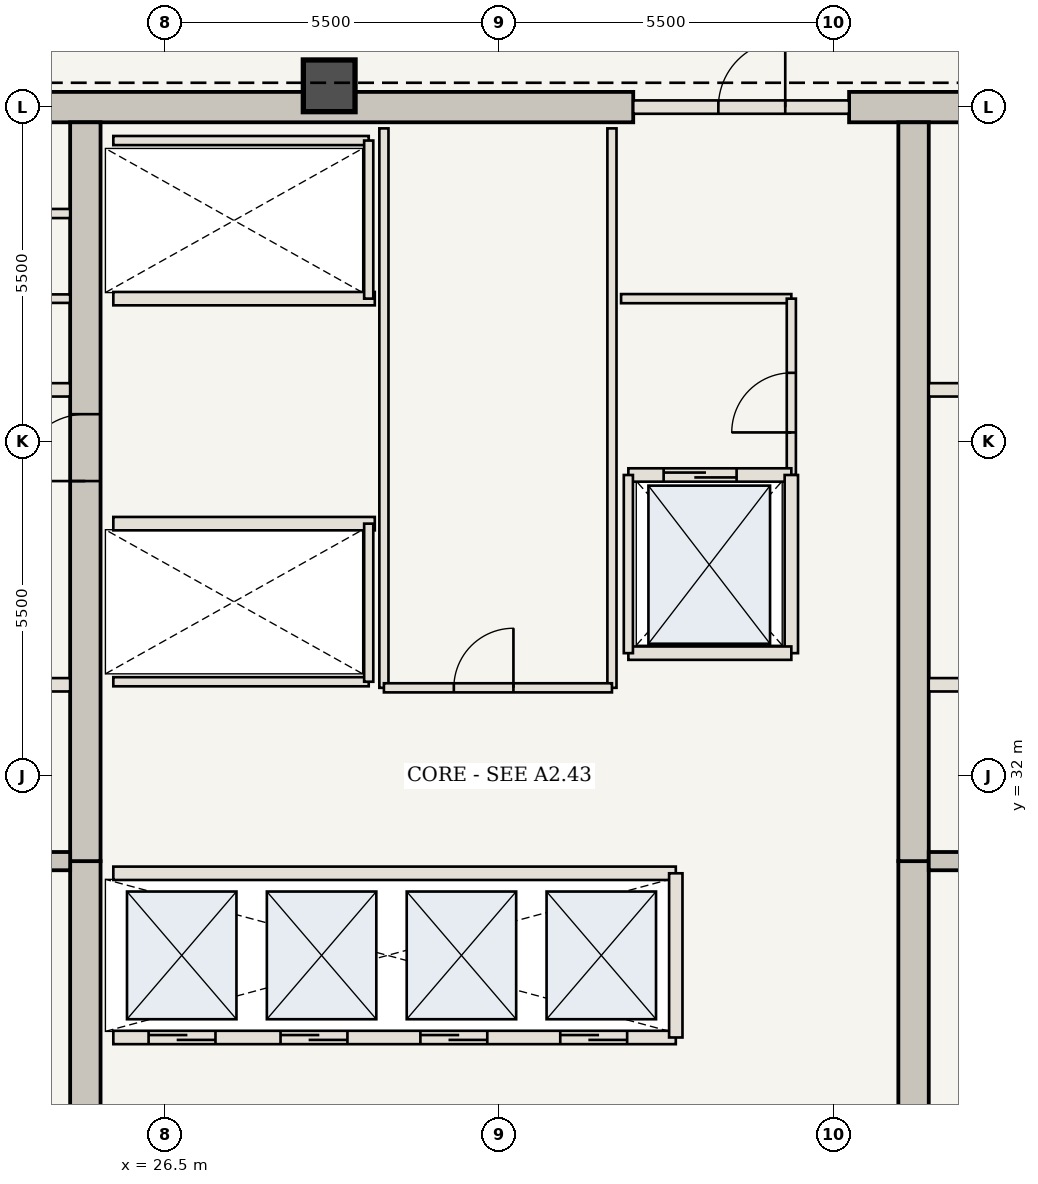
"""IFC4 building model, lengths in metres.
Left out: names, types, materials, properties, quantities, classifications, styles, units other than length and angle.
Written with IfcOpenShell. Run it as: python <this file> out.ifc"""

import sys

from ifc_helpers import new_model, si_unit, direction, frame, frame_2d, origin, origin_2d, place, context, subcontext, project, spatial, rectangle, extrude, element, fill, save


model = new_model("IFC4")
c1 = context("Model", 3, precision=1e-05, world=origin(), true_north=direction((0.0, 1.0)))
c2 = subcontext(c1, "Body", "Model", "MODEL_VIEW")
j1 = project(units=[si_unit("LENGTHUNIT", "METRE"), si_unit("PLANEANGLEUNIT", "RADIAN")], contexts=[c1])
p1 = place(None, origin())
s1 = spatial("IfcSite", under=j1, at=p1, CompositionType="ELEMENT")
p2 = place(p1, origin())
s2 = spatial("IfcBuilding", under=s1, at=p2, CompositionType="ELEMENT")
p3 = place(p2, frame((0.0, 0.0, 194.6)))
s3 = spatial("IfcBuildingStorey", under=s2, at=p3, CompositionType="ELEMENT", Elevation=194.6)
p4 = place(p3, frame((21.41, 43.0, 0.0), z_axis=(0.0, 0.0, 1.0), x_axis=(1.0, 0.0, 0.0)))
e1 = element("IfcWall", 1, at=p4, inside=s3, PredefinedType="SHEAR", context=c2, shape_type="SweptSolid", body=[
    extrude(rectangle(XDim=12.79, YDim=0.5, at=frame_2d((6.395, 0.0))), origin(), (0.0, 0.0, 1.0), 3.85),
])
p5 = place(p3, frame((37.75, 43.0, 0.0), z_axis=(0.0, 0.0, 1.0), x_axis=(1.0, 0.0, 0.0)))
e2 = element("IfcWall", 2, at=p5, inside=s3, PredefinedType="SHEAR", context=c2, shape_type="SweptSolid", body=[
    extrude(rectangle(XDim=4.84, YDim=0.5, at=frame_2d((2.42, 0.0))), origin(), (0.0, 0.0, 1.0), 3.85),
])
p6 = place(p3, frame((25.19, 21.2, 0.0), z_axis=(0.0, 0.0, 1.0), x_axis=(0.0, 1.0, 0.0)))
e3 = element("IfcWall", 3, at=p6, inside=s3, PredefinedType="SHEAR", context=c2, shape_type="SweptSolid", body=[
    extrude(rectangle(XDim=9.4, YDim=0.5, at=frame_2d((4.7, 0.0))), origin(), (0.0, 0.0, 1.0), 3.85),
])
p7 = place(p3, frame((25.19, 30.6, 0.0), z_axis=(0.0, 0.0, 1.0), x_axis=(0.0, 1.0, 0.0)))
e4 = element("IfcWall", 4, at=p7, inside=s3, PredefinedType="SHEAR", context=c2, shape_type="SweptSolid", body=[
    extrude(rectangle(XDim=12.15, YDim=0.5, at=frame_2d((6.075, 0.0))), origin(), (0.0, 0.0, 1.0), 3.85),
])
p8 = place(p7, frame((6.25, 0.0, 0.0)))
e5 = element("IfcOpeningElement", 5, at=p8, cuts=e4, PredefinedType="OPENING", context=c2, shape_type="SweptSolid", body=[
    extrude(rectangle(XDim=1.1, YDim=2.15, at=frame_2d((0.55, 1.075))), frame((0.0, 0.26, 0.0), z_axis=(0.0, -1.0, 0.0), x_axis=(1.0, 0.0, 0.0)), (0.0, 0.0, 1.0), 0.52),
])
p9 = place(p3, frame((38.81, 21.2, 0.0), z_axis=(0.0, 0.0, 1.0), x_axis=(0.0, 1.0, 0.0)))
e6 = element("IfcWall", 6, at=p9, inside=s3, PredefinedType="SHEAR", context=c2, shape_type="SweptSolid", body=[
    extrude(rectangle(XDim=9.4, YDim=0.5, at=frame_2d((4.7, 0.0))), origin(), (0.0, 0.0, 1.0), 3.85),
])
p10 = place(p3, frame((38.81, 30.6, 0.0), z_axis=(0.0, 0.0, 1.0), x_axis=(0.0, 1.0, 0.0)))
e7 = element("IfcWall", 7, at=p10, inside=s3, PredefinedType="SHEAR", context=c2, shape_type="SweptSolid", body=[
    extrude(rectangle(XDim=12.15, YDim=0.5, at=frame_2d((6.075, 0.0))), origin(), (0.0, 0.0, 1.0), 3.85),
])
p11 = place(p3, frame((29.2, 43.35, 0.0), z_axis=(0.0, 0.0, 1.0), x_axis=(1.0, 0.0, 0.0)))
e8 = element("IfcColumn", 8, at=p11, inside=s3, PredefinedType="COLUMN", context=c2, shape_type="SweptSolid", body=[
    extrude(rectangle(XDim=0.85, YDim=0.85, at=origin_2d()), origin(), (0.0, 0.0, 1.0), 3.85),
])
for number, where, z_axis, x_axis in (
    (9, (21.41, 30.6, 0.0), (0.0, 0.0, 1.0), (1.0, 0.0, 0.0)),
    (10, (39.06, 30.6, 0.0), (0.0, 0.0, 1.0), (1.0, 0.0, 0.0)),
):
    element("IfcWall", number, at=place(p3, frame(where, z_axis=z_axis, x_axis=x_axis)), inside=s3, PredefinedType="SHEAR", context=c2, shape_type="SweptSolid", body=[
        extrude(rectangle(XDim=3.53, YDim=0.3, at=frame_2d((1.765, 0.0))), origin(), (0.0, 0.0, 1.0), 3.685),
    ])
p12 = place(p3, frame((21.41, 33.5, 0.0), z_axis=(0.0, 0.0, 1.0), x_axis=(1.0, 0.0, 0.0)))
e11 = element("IfcWall", 11, at=p12, inside=s3, PredefinedType="STANDARD", context=c2, shape_type="SweptSolid", body=[
    extrude(rectangle(XDim=3.53, YDim=0.22, at=frame_2d((1.765, 0.0))), origin(), (0.0, 0.0, 1.0), 3.685),
])
p13 = place(p12, frame((0.75, 0.0, 0.0)))
e12 = element("IfcOpeningElement", 12, at=p13, cuts=e11, PredefinedType="OPENING", context=c2, shape_type="SweptSolid", body=[
    extrude(rectangle(XDim=1.2, YDim=2.2, at=frame_2d((0.6, 1.1))), frame((0.0, 0.12, 0.0), z_axis=(0.0, -1.0, 0.0), x_axis=(1.0, 0.0, 0.0)), (0.0, 0.0, 1.0), 0.24),
])
p14 = place(p3, frame((39.06, 33.5, 0.0), z_axis=(0.0, 0.0, 1.0), x_axis=(1.0, 0.0, 0.0)))
e13 = element("IfcWall", 13, at=p14, inside=s3, PredefinedType="STANDARD", context=c2, shape_type="SweptSolid", body=[
    extrude(rectangle(XDim=3.53, YDim=0.22, at=frame_2d((1.765, 0.0))), origin(), (0.0, 0.0, 1.0), 3.685),
])
p15 = place(p14, frame((1.55, 0.0, 0.0)))
e14 = element("IfcOpeningElement", 14, at=p15, cuts=e13, PredefinedType="OPENING", context=c2, shape_type="SweptSolid", body=[
    extrude(rectangle(XDim=1.2, YDim=2.2, at=frame_2d((0.6, 1.1))), frame((0.0, 0.12, 0.0), z_axis=(0.0, -1.0, 0.0), x_axis=(1.0, 0.0, 0.0)), (0.0, 0.0, 1.0), 0.24),
])
for number, where, z_axis, x_axis in (
    (15, (21.41, 38.35, 0.0), (0.0, 0.0, 1.0), (1.0, 0.0, 0.0)),
    (16, (39.06, 38.35, 0.0), (0.0, 0.0, 1.0), (1.0, 0.0, 0.0)),
):
    element("IfcWall", number, at=place(p3, frame(where, z_axis=z_axis, x_axis=x_axis)), inside=s3, PredefinedType="STANDARD", context=c2, shape_type="SweptSolid", body=[
        extrude(rectangle(XDim=3.53, YDim=0.22, at=frame_2d((1.765, 0.0))), origin(), (0.0, 0.0, 1.0), 3.685),
    ])
p16 = place(p3, frame((21.41, 39.85, 0.0), z_axis=(0.0, 0.0, 1.0), x_axis=(1.0, 0.0, 0.0)))
e17 = element("IfcWall", 17, at=p16, inside=s3, PredefinedType="STANDARD", context=c2, shape_type="SweptSolid", body=[
    extrude(rectangle(XDim=3.53, YDim=0.14, at=frame_2d((1.765, 0.0))), origin(), (0.0, 0.0, 1.0), 3.685),
])
p17 = place(p3, frame((21.41, 41.25, 0.0), z_axis=(0.0, 0.0, 1.0), x_axis=(1.0, 0.0, 0.0)))
e18 = element("IfcWall", 18, at=p17, inside=s3, PredefinedType="STANDARD", context=c2, shape_type="SweptSolid", body=[
    extrude(rectangle(XDim=3.53, YDim=0.15, at=frame_2d((1.765, 0.0))), origin(), (0.0, 0.0, 1.0), 3.685),
])
p18 = place(p3, frame((34.0, 39.85, 0.0), z_axis=(0.0, 0.0, 1.0), x_axis=(1.0, 0.0, 0.0)))
e19 = element("IfcWall", 19, at=p18, inside=s3, PredefinedType="STANDARD", context=c2, shape_type="SweptSolid", body=[
    extrude(rectangle(XDim=2.8, YDim=0.15, at=frame_2d((1.4, 0.0))), origin(), (0.0, 0.0, 1.0), 3.685),
])
p19 = place(p3, frame((36.8, 36.95, 0.0), z_axis=(0.0, 0.0, 1.0), x_axis=(0.0, 1.0, 0.0)))
e20 = element("IfcWall", 20, at=p19, inside=s3, PredefinedType="STANDARD", context=c2, shape_type="SweptSolid", body=[
    extrude(rectangle(XDim=2.9, YDim=0.15, at=frame_2d((1.45, 0.0))), origin(), (0.0, 0.0, 1.0), 3.685),
])
p20 = place(p19, frame((0.7, 0.0, 0.0)))
e21 = element("IfcOpeningElement", 21, at=p20, cuts=e20, PredefinedType="OPENING", context=c2, shape_type="SweptSolid", body=[
    extrude(rectangle(XDim=0.98, YDim=2.2, at=frame_2d((0.49, 1.1))), frame((0.0, 0.085, 0.0), z_axis=(0.0, -1.0, 0.0), x_axis=(1.0, 0.0, 0.0)), (0.0, 0.0, 1.0), 0.17),
])
p21 = place(p3, frame((25.65, 27.7, 0.0), z_axis=(0.0, 0.0, 1.0), x_axis=(1.0, 0.0, 0.0)))
e22 = element("IfcWall", 22, at=p21, inside=s3, PredefinedType="STANDARD", context=c2, shape_type="SweptSolid", body=[
    extrude(rectangle(XDim=9.25, YDim=0.22, at=frame_2d((4.625, 0.0))), origin(), (0.0, 0.0, 1.0), 3.685),
])
p22 = place(p21, frame((0.58, 0.0, 0.0)))
e23 = element("IfcOpeningElement", 23, at=p22, cuts=e22, PredefinedType="OPENING", context=c2, shape_type="SweptSolid", body=[
    extrude(rectangle(XDim=1.1, YDim=2.15, at=frame_2d((0.55, 1.075))), frame((0.0, 0.12, 0.0), z_axis=(0.0, -1.0, 0.0), x_axis=(1.0, 0.0, 0.0)), (0.0, 0.0, 1.0), 0.24),
])
p23 = place(p21, frame((2.75, 0.0, 0.0)))
e24 = element("IfcOpeningElement", 24, at=p23, cuts=e22, PredefinedType="OPENING", context=c2, shape_type="SweptSolid", body=[
    extrude(rectangle(XDim=1.1, YDim=2.15, at=frame_2d((0.55, 1.075))), frame((0.0, 0.12, 0.0), z_axis=(0.0, -1.0, 0.0), x_axis=(1.0, 0.0, 0.0)), (0.0, 0.0, 1.0), 0.24),
])
p24 = place(p21, frame((5.05, 0.0, 0.0)))
e25 = element("IfcOpeningElement", 25, at=p24, cuts=e22, PredefinedType="OPENING", context=c2, shape_type="SweptSolid", body=[
    extrude(rectangle(XDim=1.1, YDim=2.15, at=frame_2d((0.55, 1.075))), frame((0.0, 0.12, 0.0), z_axis=(0.0, -1.0, 0.0), x_axis=(1.0, 0.0, 0.0)), (0.0, 0.0, 1.0), 0.24),
])
p25 = place(p21, frame((7.35, 0.0, 0.0)))
e26 = element("IfcOpeningElement", 26, at=p25, cuts=e22, PredefinedType="OPENING", context=c2, shape_type="SweptSolid", body=[
    extrude(rectangle(XDim=1.1, YDim=2.15, at=frame_2d((0.55, 1.075))), frame((0.0, 0.12, 0.0), z_axis=(0.0, -1.0, 0.0), x_axis=(1.0, 0.0, 0.0)), (0.0, 0.0, 1.0), 0.24),
])
p26 = place(p3, frame((25.65, 30.4, 0.0), z_axis=(0.0, 0.0, 1.0), x_axis=(1.0, 0.0, 0.0)))
e27 = element("IfcWall", 27, at=p26, inside=s3, PredefinedType="STANDARD", context=c2, shape_type="SweptSolid", body=[
    extrude(rectangle(XDim=9.25, YDim=0.22, at=frame_2d((4.625, 0.0))), origin(), (0.0, 0.0, 1.0), 3.685),
])
p27 = place(p3, frame((34.9, 27.7, 0.0), z_axis=(0.0, 0.0, 1.0), x_axis=(0.0, 1.0, 0.0)))
e28 = element("IfcWall", 28, at=p27, inside=s3, PredefinedType="STANDARD", context=c2, shape_type="SweptSolid", body=[
    extrude(rectangle(XDim=2.7, YDim=0.22, at=frame_2d((1.35, 0.0))), origin(), (0.0, 0.0, 1.0), 3.685),
])
p28 = place(p3, frame((25.65, 36.15, 0.0), z_axis=(0.0, 0.0, 1.0), x_axis=(1.0, 0.0, 0.0)))
e29 = element("IfcWall", 29, at=p28, inside=s3, PredefinedType="STANDARD", context=c2, shape_type="SweptSolid", body=[
    extrude(rectangle(XDim=4.3, YDim=0.22, at=frame_2d((2.15, 0.0))), origin(), (0.0, 0.0, 1.0), 3.685),
])
p29 = place(p3, frame((25.65, 33.55, 0.0), z_axis=(0.0, 0.0, 1.0), x_axis=(1.0, 0.0, 0.0)))
e30 = element("IfcWall", 30, at=p29, inside=s3, PredefinedType="STANDARD", context=c2, shape_type="SweptSolid", body=[
    extrude(rectangle(XDim=4.2, YDim=0.15, at=frame_2d((2.1, 0.0))), origin(), (0.0, 0.0, 1.0), 3.685),
])
p30 = place(p3, frame((29.85, 33.55, 0.0), z_axis=(0.0, 0.0, 1.0), x_axis=(0.0, 1.0, 0.0)))
e31 = element("IfcWall", 31, at=p30, inside=s3, PredefinedType="STANDARD", context=c2, shape_type="SweptSolid", body=[
    extrude(rectangle(XDim=2.6, YDim=0.15, at=frame_2d((1.3, 0.0))), origin(), (0.0, 0.0, 1.0), 3.685),
])
p31 = place(p3, frame((25.65, 39.85, 0.0), z_axis=(0.0, 0.0, 1.0), x_axis=(1.0, 0.0, 0.0)))
e32 = element("IfcWall", 32, at=p31, inside=s3, PredefinedType="STANDARD", context=c2, shape_type="SweptSolid", body=[
    extrude(rectangle(XDim=4.3, YDim=0.22, at=frame_2d((2.15, 0.0))), origin(), (0.0, 0.0, 1.0), 3.685),
])
p32 = place(p3, frame((25.65, 42.45, 0.0), z_axis=(0.0, 0.0, 1.0), x_axis=(1.0, 0.0, 0.0)))
e33 = element("IfcWall", 33, at=p32, inside=s3, PredefinedType="STANDARD", context=c2, shape_type="SweptSolid", body=[
    extrude(rectangle(XDim=4.2, YDim=0.15, at=frame_2d((2.1, 0.0))), origin(), (0.0, 0.0, 1.0), 3.685),
])
p33 = place(p3, frame((29.85, 39.85, 0.0), z_axis=(0.0, 0.0, 1.0), x_axis=(0.0, 1.0, 0.0)))
e34 = element("IfcWall", 34, at=p33, inside=s3, PredefinedType="STANDARD", context=c2, shape_type="SweptSolid", body=[
    extrude(rectangle(XDim=2.6, YDim=0.15, at=frame_2d((1.3, 0.0))), origin(), (0.0, 0.0, 1.0), 3.685),
])
for number, where, z_axis, x_axis in (
    (35, (30.1, 33.45, 0.0), (0.0, 0.0, 1.0), (0.0, 1.0, 0.0)),
    (36, (33.85, 33.45, 0.0), (0.0, 0.0, 1.0), (0.0, 1.0, 0.0)),
):
    element("IfcWall", number, at=place(p3, frame(where, z_axis=z_axis, x_axis=x_axis)), inside=s3, PredefinedType="STANDARD", context=c2, shape_type="SweptSolid", body=[
        extrude(rectangle(XDim=9.2, YDim=0.15, at=frame_2d((4.6, 0.0))), origin(), (0.0, 0.0, 1.0), 3.685),
    ])
p34 = place(p3, frame((30.1, 33.45, 0.0), z_axis=(0.0, 0.0, 1.0), x_axis=(1.0, 0.0, 0.0)))
e37 = element("IfcWall", 37, at=p34, inside=s3, PredefinedType="STANDARD", context=c2, shape_type="SweptSolid", body=[
    extrude(rectangle(XDim=3.75, YDim=0.15, at=frame_2d((1.875, 0.0))), origin(), (0.0, 0.0, 1.0), 3.685),
])
p35 = place(p34, frame((1.15, 0.0, 0.0)))
e38 = element("IfcOpeningElement", 38, at=p35, cuts=e37, PredefinedType="OPENING", context=c2, shape_type="SweptSolid", body=[
    extrude(rectangle(XDim=0.98, YDim=2.2, at=frame_2d((0.49, 1.1))), frame((0.0, 0.085, 0.0), z_axis=(0.0, -1.0, 0.0), x_axis=(1.0, 0.0, 0.0)), (0.0, 0.0, 1.0), 0.17),
])
p36 = place(p3, frame((34.2, 43.0, 0.0), z_axis=(0.0, 0.0, 1.0), x_axis=(1.0, 0.0, 0.0)))
e39 = element("IfcWall", 39, at=p36, inside=s3, PredefinedType="STANDARD", context=c2, shape_type="SweptSolid", body=[
    extrude(rectangle(XDim=3.55, YDim=0.22, at=frame_2d((1.775, 0.0))), origin(), (0.0, 0.0, 1.0), 3.685),
])
p37 = place(p36, frame((1.4, 0.0, 0.0)))
e40 = element("IfcOpeningElement", 40, at=p37, cuts=e39, PredefinedType="OPENING", context=c2, shape_type="SweptSolid", body=[
    extrude(rectangle(XDim=1.1, YDim=2.15, at=frame_2d((0.55, 1.075))), frame((0.0, 0.12, 0.0), z_axis=(0.0, -1.0, 0.0), x_axis=(1.0, 0.0, 0.0)), (0.0, 0.0, 1.0), 0.24),
])
p38 = place(p3, frame((34.12, 36.95, 0.0), z_axis=(0.0, 0.0, 1.0), x_axis=(1.0, 0.0, 0.0)))
e41 = element("IfcWall", 41, at=p38, inside=s3, PredefinedType="STANDARD", context=c2, shape_type="SweptSolid", body=[
    extrude(rectangle(XDim=2.68, YDim=0.22, at=frame_2d((1.34, 0.0))), origin(), (0.0, 0.0, 1.0), 3.685),
])
p39 = place(p38, frame((0.58, 0.0, 0.0)))
e42 = element("IfcOpeningElement", 42, at=p39, cuts=e41, PredefinedType="OPENING", context=c2, shape_type="SweptSolid", body=[
    extrude(rectangle(XDim=1.2, YDim=2.2, at=frame_2d((0.6, 1.1))), frame((0.0, 0.12, 0.0), z_axis=(0.0, -1.0, 0.0), x_axis=(1.0, 0.0, 0.0)), (0.0, 0.0, 1.0), 0.24),
])
p40 = place(p3, frame((36.8, 34.02, 0.0), z_axis=(0.0, 0.0, 1.0), x_axis=(0.0, 1.0, 0.0)))
e43 = element("IfcWall", 43, at=p40, inside=s3, PredefinedType="STANDARD", context=c2, shape_type="SweptSolid", body=[
    extrude(rectangle(XDim=2.93, YDim=0.22, at=frame_2d((1.465, 0.0))), origin(), (0.0, 0.0, 1.0), 3.685),
])
p41 = place(p3, frame((34.12, 34.02, 0.0), z_axis=(0.0, 0.0, 1.0), x_axis=(1.0, 0.0, 0.0)))
e44 = element("IfcWall", 44, at=p41, inside=s3, PredefinedType="STANDARD", context=c2, shape_type="SweptSolid", body=[
    extrude(rectangle(XDim=2.68, YDim=0.22, at=frame_2d((1.34, 0.0))), origin(), (0.0, 0.0, 1.0), 3.685),
])
p42 = place(p3, frame((34.12, 34.02, 0.0), z_axis=(0.0, 0.0, 1.0), x_axis=(0.0, 1.0, 0.0)))
e45 = element("IfcWall", 45, at=p42, inside=s3, PredefinedType="STANDARD", context=c2, shape_type="SweptSolid", body=[
    extrude(rectangle(XDim=2.93, YDim=0.15, at=frame_2d((1.465, 0.0))), origin(), (0.0, 0.0, 1.0), 3.685),
])
p43 = place(p8, origin())
e46 = element("IfcDoor", 46, at=p43, inside=s3, OperationType="SINGLE_SWING_LEFT", PredefinedType="DOOR", context=c2, shape_type="SweptSolid", body=[
    extrude(rectangle(XDim=1.1, YDim=2.15, at=frame_2d((0.55, 1.075))), frame((0.0, 0.025, 0.0), z_axis=(0.0, -1.0, 0.0), x_axis=(1.0, 0.0, 0.0)), (0.0, 0.0, 1.0), 0.05),
])
fill(e5, e46)
p44 = place(p20, origin())
e47 = element("IfcDoor", 47, at=p44, inside=s3, OperationType="SINGLE_SWING_LEFT", PredefinedType="DOOR", context=c2, shape_type="SweptSolid", body=[
    extrude(rectangle(XDim=0.98, YDim=2.2, at=frame_2d((0.49, 1.1))), frame((0.0, 0.025, 0.0), z_axis=(0.0, -1.0, 0.0), x_axis=(1.0, 0.0, 0.0)), (0.0, 0.0, 1.0), 0.05),
])
fill(e21, e47)
p45 = place(p22, origin())
e48 = element("IfcDoor", 48, at=p45, inside=s3, OperationType="DOUBLE_DOOR_SLIDING", PredefinedType="DOOR", context=c2, shape_type="SweptSolid", body=[
    extrude(rectangle(XDim=1.1, YDim=2.15, at=frame_2d((0.55, 1.075))), frame((0.0, 0.025, 0.0), z_axis=(0.0, -1.0, 0.0), x_axis=(1.0, 0.0, 0.0)), (0.0, 0.0, 1.0), 0.05),
])
fill(e23, e48)
p46 = place(p23, origin())
e49 = element("IfcDoor", 49, at=p46, inside=s3, OperationType="DOUBLE_DOOR_SLIDING", PredefinedType="DOOR", context=c2, shape_type="SweptSolid", body=[
    extrude(rectangle(XDim=1.1, YDim=2.15, at=frame_2d((0.55, 1.075))), frame((0.0, 0.025, 0.0), z_axis=(0.0, -1.0, 0.0), x_axis=(1.0, 0.0, 0.0)), (0.0, 0.0, 1.0), 0.05),
])
fill(e24, e49)
p47 = place(p24, origin())
e50 = element("IfcDoor", 50, at=p47, inside=s3, OperationType="DOUBLE_DOOR_SLIDING", PredefinedType="DOOR", context=c2, shape_type="SweptSolid", body=[
    extrude(rectangle(XDim=1.1, YDim=2.15, at=frame_2d((0.55, 1.075))), frame((0.0, 0.025, 0.0), z_axis=(0.0, -1.0, 0.0), x_axis=(1.0, 0.0, 0.0)), (0.0, 0.0, 1.0), 0.05),
])
fill(e25, e50)
p48 = place(p25, origin())
e51 = element("IfcDoor", 51, at=p48, inside=s3, OperationType="DOUBLE_DOOR_SLIDING", PredefinedType="DOOR", context=c2, shape_type="SweptSolid", body=[
    extrude(rectangle(XDim=1.1, YDim=2.15, at=frame_2d((0.55, 1.075))), frame((0.0, 0.025, 0.0), z_axis=(0.0, -1.0, 0.0), x_axis=(1.0, 0.0, 0.0)), (0.0, 0.0, 1.0), 0.05),
])
fill(e26, e51)
p49 = place(p35, origin())
e52 = element("IfcDoor", 52, at=p49, inside=s3, OperationType="SINGLE_SWING_RIGHT", PredefinedType="DOOR", context=c2, shape_type="SweptSolid", body=[
    extrude(rectangle(XDim=0.98, YDim=2.2, at=frame_2d((0.49, 1.1))), frame((0.0, 0.025, 0.0), z_axis=(0.0, -1.0, 0.0), x_axis=(1.0, 0.0, 0.0)), (0.0, 0.0, 1.0), 0.05),
])
fill(e38, e52)
p50 = place(p37, origin())
e53 = element("IfcDoor", 53, at=p50, inside=s3, OperationType="SINGLE_SWING_RIGHT", PredefinedType="DOOR", context=c2, shape_type="SweptSolid", body=[
    extrude(rectangle(XDim=1.1, YDim=2.15, at=frame_2d((0.55, 1.075))), frame((0.0, 0.025, 0.0), z_axis=(0.0, -1.0, 0.0), x_axis=(1.0, 0.0, 0.0)), (0.0, 0.0, 1.0), 0.05),
])
fill(e40, e53)
p51 = place(p39, origin())
e54 = element("IfcDoor", 54, at=p51, inside=s3, OperationType="DOUBLE_DOOR_SLIDING", PredefinedType="DOOR", context=c2, shape_type="SweptSolid", body=[
    extrude(rectangle(XDim=1.2, YDim=2.2, at=frame_2d((0.6, 1.1))), frame((0.0, 0.025, 0.0), z_axis=(0.0, -1.0, 0.0), x_axis=(1.0, 0.0, 0.0)), (0.0, 0.0, 1.0), 0.05),
])
fill(e42, e54)
save(model, sys.argv[1])
